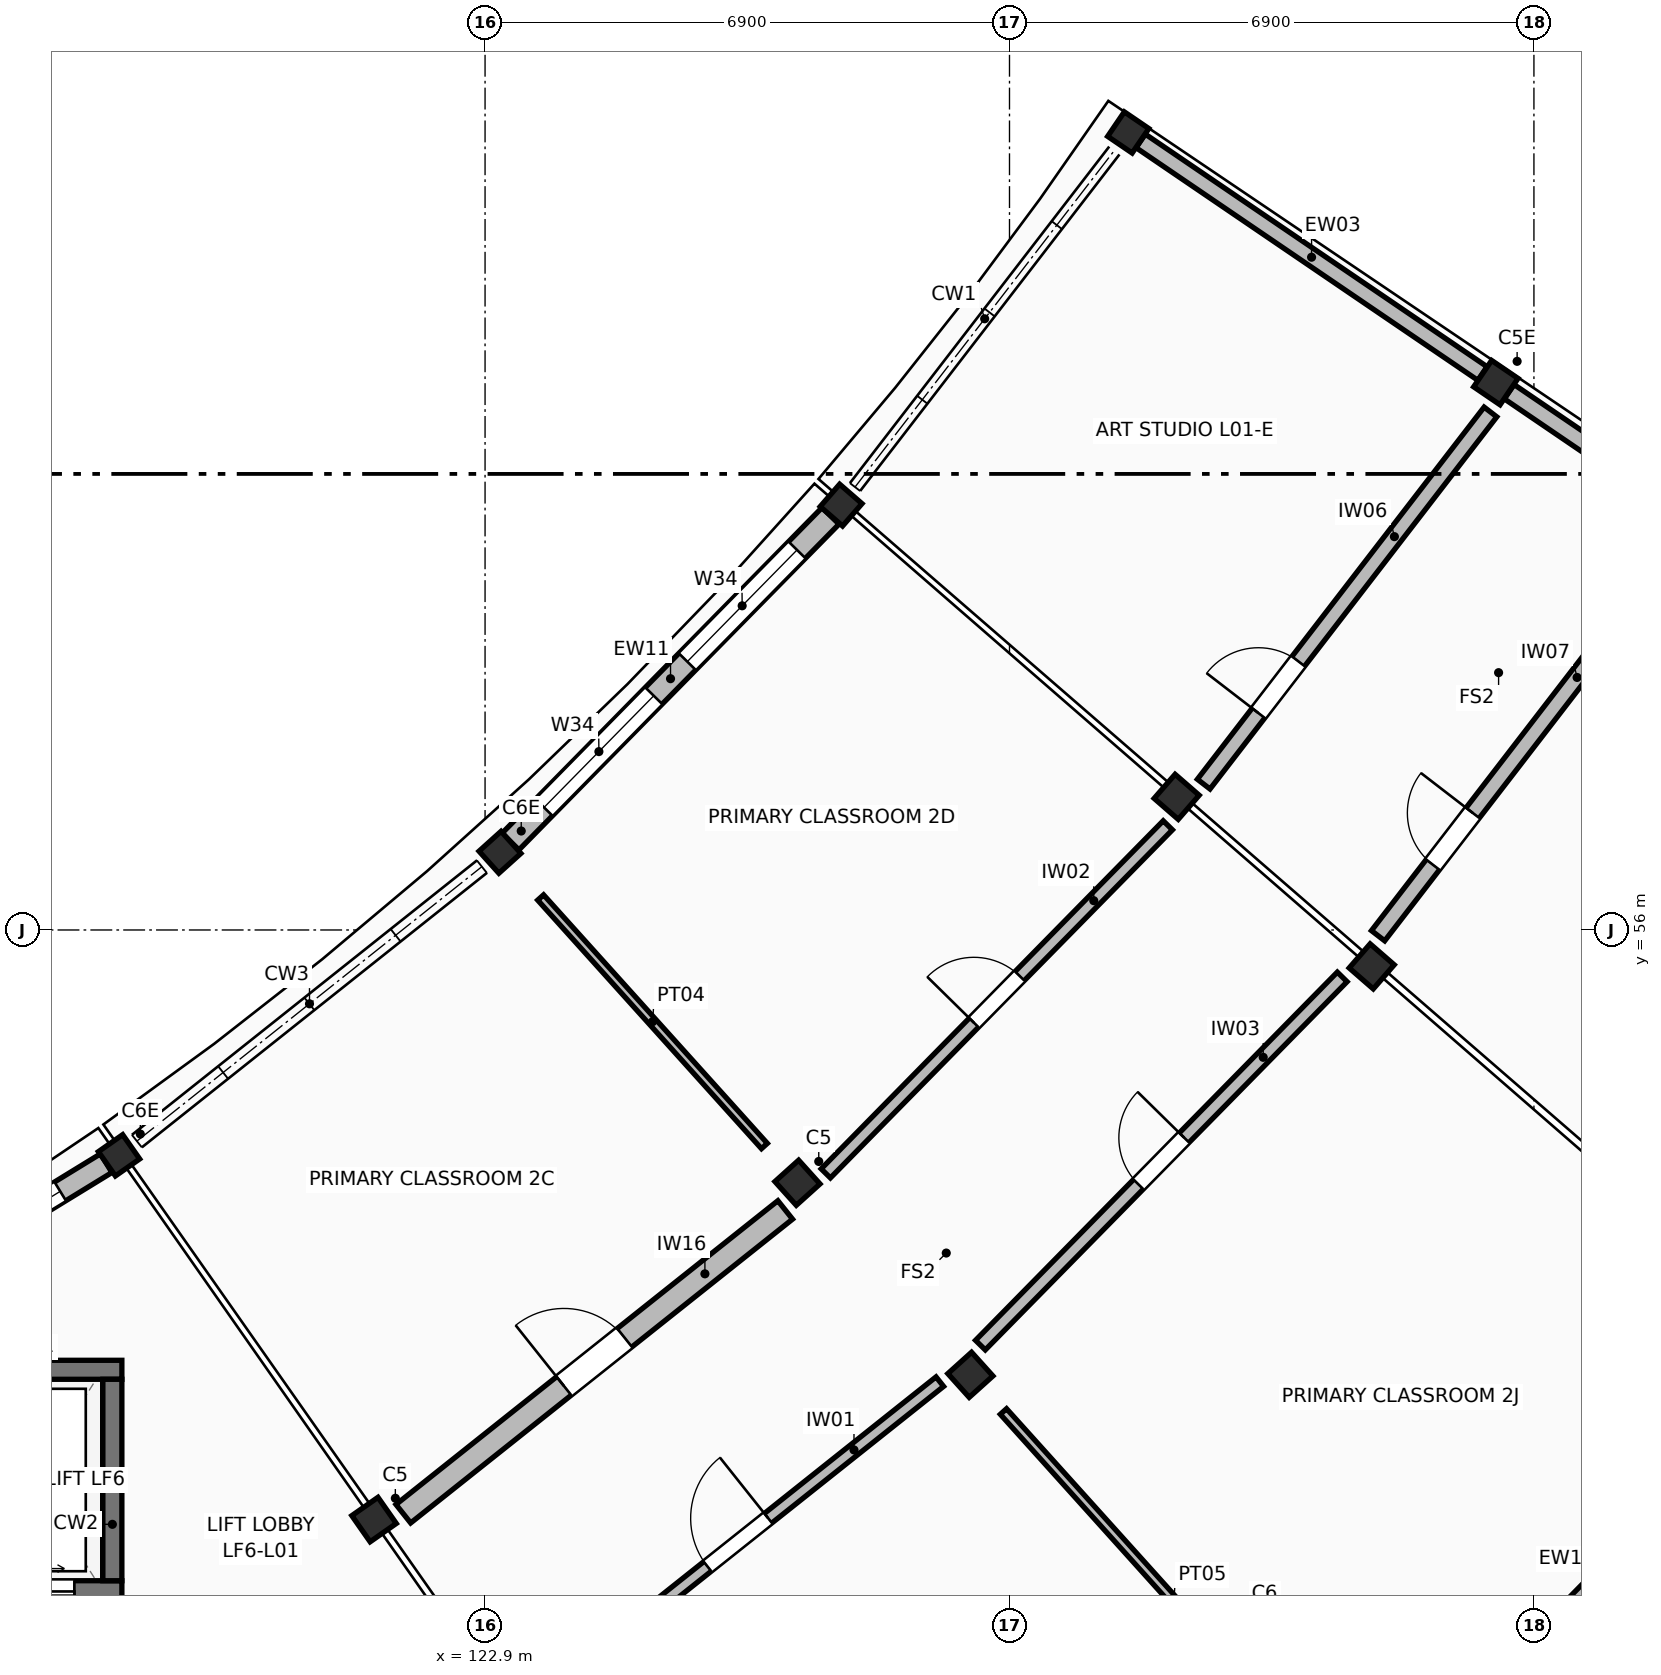
"""IFC4 building model, lengths in metres.
Left out: names, types, materials, properties, quantities, classifications, styles, units other than length and angle.
Written with IfcOpenShell. Run it as: python <this file> out.ifc"""

import sys

from ifc_helpers import new_model, si_unit, direction, frame, frame_2d, origin, origin_2d, place, context, subcontext, project, spatial, rectangle, extrude, element, fill, save


model = new_model("IFC4")
c1 = context("Model", 3, precision=1e-05, world=origin(), true_north=direction((0.0, 1.0)))
c2 = subcontext(c1, "Body", "Model", "MODEL_VIEW")
j1 = project(units=[si_unit("LENGTHUNIT", "METRE"), si_unit("PLANEANGLEUNIT", "RADIAN")], contexts=[c1])
p1 = place(None, origin())
s1 = spatial("IfcSite", under=j1, at=p1, CompositionType="ELEMENT")
p2 = place(p1, origin())
s2 = spatial("IfcBuilding", under=s1, at=p2, CompositionType="ELEMENT")
p3 = place(p2, frame((0.0, 0.0, 4.42)))
s3 = spatial("IfcBuildingStorey", under=s2, at=p3, CompositionType="ELEMENT", Elevation=4.42)
p4 = place(p3, frame((118.084, 53.035, 0.0), z_axis=(0.0, 0.0, 1.0), x_axis=(0.573576436351, -0.819152044289, 0.0)))
e1 = element("IfcColumn", 1, at=p4, inside=s3, PredefinedType="COLUMN", context=c2, shape_type="SweptSolid", body=[
    extrude(rectangle(XDim=0.39, YDim=0.39, at=origin_2d()), origin(), (0.0, 0.0, 1.0), 3.74),
])
p5 = place(p3, frame((121.439, 48.243, 0.0), z_axis=(0.0, 0.0, 1.0), x_axis=(0.573576436351, -0.819152044289, 0.0)))
e2 = element("IfcColumn", 2, at=p5, inside=s3, PredefinedType="COLUMN", context=c2, shape_type="SweptSolid", body=[
    extrude(rectangle(XDim=0.42, YDim=0.42, at=origin_2d()), origin(), (0.0, 0.0, 1.0), 3.74),
])
p6 = place(p3, frame((123.096, 57.022, 0.0), z_axis=(0.0, 0.0, 1.0), x_axis=(0.669130606359, -0.743144825477, 0.0)))
e3 = element("IfcColumn", 3, at=p6, inside=s3, PredefinedType="COLUMN", context=c2, shape_type="SweptSolid", body=[
    extrude(rectangle(XDim=0.39, YDim=0.39, at=origin_2d()), origin(), (0.0, 0.0, 1.0), 3.74),
])
for number, where, z_axis, x_axis in (
    (4, (127.01, 52.675, 0.0), (0.0, 0.0, 1.0), (0.669, -0.743, 0.0)),
    (5, (129.285, 50.148, 0.0), (0.0, 0.0, 1.0), (0.669, -0.743, 0.0)),
):
    element("IfcColumn", number, at=place(p3, frame(where, z_axis=z_axis, x_axis=x_axis)), inside=s3, PredefinedType="COLUMN", context=c2, shape_type="SweptSolid", body=[
        extrude(rectangle(XDim=0.42, YDim=0.42, at=origin_2d()), origin(), (0.0, 0.0, 1.0), 3.74),
    ])
p7 = place(p3, frame((127.584, 61.59, 0.0), z_axis=(0.0, 0.0, 1.0), x_axis=(0.754709580223, -0.656059028991, 0.0)))
e6 = element("IfcColumn", 6, at=p7, inside=s3, PredefinedType="COLUMN", context=c2, shape_type="SweptSolid", body=[
    extrude(rectangle(XDim=0.39, YDim=0.39, at=origin_2d()), origin(), (0.0, 0.0, 1.0), 3.74),
])
for number, where, z_axis, x_axis in (
    (7, (132.0, 57.752, 0.0), (0.0, 0.0, 1.0), (0.755, -0.656, 0.0)),
    (8, (134.566, 55.521, 0.0), (0.0, 0.0, 1.0), (0.755, -0.656, 0.0)),
):
    element("IfcColumn", number, at=place(p3, frame(where, z_axis=z_axis, x_axis=x_axis)), inside=s3, PredefinedType="COLUMN", context=c2, shape_type="SweptSolid", body=[
        extrude(rectangle(XDim=0.42, YDim=0.42, at=origin_2d()), origin(), (0.0, 0.0, 1.0), 3.74),
    ])
p8 = place(p3, frame((131.363, 66.492, 0.0), z_axis=(0.0, 0.0, 1.0), x_axis=(0.826786154745, -0.562516359159, 0.0)))
e9 = element("IfcColumn", 9, at=p8, inside=s3, PredefinedType="COLUMN", context=c2, shape_type="SweptSolid", body=[
    extrude(rectangle(XDim=0.39, YDim=0.39, at=origin_2d()), origin(), (0.0, 0.0, 1.0), 3.74),
])
p9 = place(p3, frame((136.199, 63.201, 0.0), z_axis=(0.0, 0.0, 1.0), x_axis=(0.826786154745, -0.562516359159, 0.0)))
e10 = element("IfcColumn", 10, at=p9, inside=s3, PredefinedType="COLUMN", context=c2, shape_type="SweptSolid", body=[
    extrude(rectangle(XDim=0.42, YDim=0.42, at=origin_2d()), origin(), (0.0, 0.0, 1.0), 3.74),
])
p10 = place(p3, frame((115.771, 50.214, 0.0), z_axis=(0.0, 0.0, 1.0), x_axis=(1.0, 0.0, 0.0)))
e11 = element("IfcWall", 11, at=p10, inside=s3, PredefinedType="SHEAR", context=c2, shape_type="SweptSolid", body=[
    extrude(rectangle(XDim=2.35, YDim=0.25, at=frame_2d((1.175, 0.0))), origin(), (0.0, 0.0, 1.0), 3.49),
])
p11 = place(p3, frame((115.771, 47.314, 0.0), z_axis=(0.0, 0.0, 1.0), x_axis=(1.0, 0.0, 0.0)))
e12 = element("IfcWall", 12, at=p11, inside=s3, PredefinedType="SHEAR", context=c2, shape_type="SweptSolid", body=[
    extrude(rectangle(XDim=2.35, YDim=0.25, at=frame_2d((1.175, 0.0))), origin(), (0.0, 0.0, 1.0), 3.49),
])
p12 = place(p11, frame((0.625, 0.0, 0.0)))
e13 = element("IfcOpeningElement", 13, at=p12, cuts=e12, PredefinedType="OPENING", context=c2, shape_type="SweptSolid", body=[
    extrude(rectangle(XDim=1.1, YDim=2.15, at=frame_2d((0.55, 1.075))), frame((0.0, 0.135, 0.0), z_axis=(0.0, -1.0, 0.0), x_axis=(1.0, 0.0, 0.0)), (0.0, 0.0, 1.0), 0.27),
])
p13 = place(p3, frame((117.996, 47.439, 0.0), z_axis=(0.0, 0.0, 1.0), x_axis=(0.0, 1.0, 0.0)))
e14 = element("IfcWall", 14, at=p13, inside=s3, PredefinedType="SHEAR", context=c2, shape_type="SweptSolid", body=[
    extrude(rectangle(XDim=2.65, YDim=0.25, at=frame_2d((1.325, 0.0))), origin(), (0.0, 0.0, 1.0), 3.49),
])
p14 = place(p3, frame((112.793, 49.793, 0.0), z_axis=(0.0, 0.0, 1.0), x_axis=(0.85263629261, 0.522504882775, 0.0)))
e15 = element("IfcWall", 15, at=p14, inside=s3, PredefinedType="STANDARD", context=c2, shape_type="SweptSolid", body=[
    extrude(rectangle(XDim=6.008, YDim=0.288, at=frame_2d((3.004, 0.0))), origin(), (0.0, 0.0, 1.0), 2.78),
])
p15 = place(p14, frame((0.709, 0.0, 0.95)))
e16 = element("IfcOpeningElement", 16, at=p15, cuts=e15, PredefinedType="OPENING", context=c2, shape_type="SweptSolid", body=[
    extrude(rectangle(XDim=1.94, YDim=1.6, at=frame_2d((0.97, 0.8))), frame((0.0, 0.154, 0.0), z_axis=(0.0, -1.0, 0.0), x_axis=(1.0, 0.0, 0.0)), (0.0, 0.0, 1.0), 0.308),
])
p16 = place(p14, frame((3.359, 0.0, 0.95)))
e17 = element("IfcOpeningElement", 17, at=p16, cuts=e15, PredefinedType="OPENING", context=c2, shape_type="SweptSolid", body=[
    extrude(rectangle(XDim=1.94, YDim=1.6, at=frame_2d((0.97, 0.8))), frame((0.0, 0.154, 0.0), z_axis=(0.0, -1.0, 0.0), x_axis=(1.0, 0.0, 0.0)), (0.0, 0.0, 1.0), 0.308),
])
p17 = place(p3, frame((123.235, 57.163, 0.0), z_axis=(0.0, 0.0, 1.0), x_axis=(0.700923686005, 0.713236276698, 0.0)))
e18 = element("IfcWall", 18, at=p17, inside=s3, PredefinedType="STANDARD", context=c2, shape_type="SweptSolid", body=[
    extrude(rectangle(XDim=6.008, YDim=0.312, at=frame_2d((3.004, 0.0))), origin(), (0.0, 0.0, 1.0), 2.78),
])
p18 = place(p17, frame((0.629, 0.0, 0.95)))
e19 = element("IfcOpeningElement", 19, at=p18, cuts=e18, PredefinedType="OPENING", context=c2, shape_type="SweptSolid", body=[
    extrude(rectangle(XDim=2.06, YDim=1.3, at=frame_2d((1.03, 0.65))), frame((0.0, 0.166, 0.0), z_axis=(0.0, -1.0, 0.0), x_axis=(1.0, 0.0, 0.0)), (0.0, 0.0, 1.0), 0.332),
])
p19 = place(p17, frame((3.319, 0.0, 0.95)))
e20 = element("IfcOpeningElement", 20, at=p19, cuts=e18, PredefinedType="OPENING", context=c2, shape_type="SweptSolid", body=[
    extrude(rectangle(XDim=2.06, YDim=1.3, at=frame_2d((1.03, 0.65))), frame((0.0, 0.166, 0.0), z_axis=(0.0, -1.0, 0.0), x_axis=(1.0, 0.0, 0.0)), (0.0, 0.0, 1.0), 0.332),
])
p20 = place(p3, frame((134.677, 44.456, 0.0), z_axis=(0.0, 0.0, 1.0), x_axis=(0.70091301262, 0.713246765671, 0.0)))
e21 = element("IfcWall", 21, at=p20, inside=s3, PredefinedType="STANDARD", context=c2, shape_type="SweptSolid", body=[
    extrude(rectangle(XDim=8.096, YDim=0.324, at=frame_2d((4.048, 0.0))), origin(), (0.0, 0.0, 1.0), 2.78),
])
p21 = place(p20, frame((1.325, 0.0, 0.95)))
e22 = element("IfcOpeningElement", 22, at=p21, cuts=e21, PredefinedType="OPENING", context=c2, shape_type="SweptSolid", body=[
    extrude(rectangle(XDim=2.06, YDim=1.45, at=frame_2d((1.03, 0.725))), frame((0.0, 0.172, 0.0), z_axis=(0.0, -1.0, 0.0), x_axis=(1.0, 0.0, 0.0)), (0.0, 0.0, 1.0), 0.344),
])
p22 = place(p20, frame((4.711, 0.0, 0.95)))
e23 = element("IfcOpeningElement", 23, at=p22, cuts=e21, PredefinedType="OPENING", context=c2, shape_type="SweptSolid", body=[
    extrude(rectangle(XDim=2.06, YDim=1.45, at=frame_2d((1.03, 0.725))), frame((0.0, 0.172, 0.0), z_axis=(0.0, -1.0, 0.0), x_axis=(1.0, 0.0, 0.0)), (0.0, 0.0, 1.0), 0.344),
])
p23 = place(p3, frame((131.526, 66.381, 0.0), z_axis=(0.0, 0.0, 1.0), x_axis=(0.826743616666, -0.562578876516, 0.0)))
e24 = element("IfcWall", 24, at=p23, inside=s3, PredefinedType="STANDARD", context=c2, shape_type="SweptSolid", body=[
    extrude(rectangle(XDim=5.439, YDim=0.216, at=frame_2d((2.719, 0.0))), origin(), (0.0, 0.0, 1.0), 2.78),
])
p24 = place(p3, frame((136.375, 63.081, 0.0), z_axis=(0.0, 0.0, 1.0), x_axis=(0.826746288828, -0.562574949592, 0.0)))
e25 = element("IfcWall", 25, at=p24, inside=s3, PredefinedType="STANDARD", context=c2, shape_type="SweptSolid", body=[
    extrude(rectangle(XDim=2.974, YDim=0.228, at=frame_2d((1.487, 0.0))), origin(), (0.0, 0.0, 1.0), 2.78),
])
p25 = place(p3, frame((121.824, 48.32, 0.0), z_axis=(0.0, 0.0, 1.0), x_axis=(0.782605685559, 0.622517743467, 0.0)))
e26 = element("IfcWall", 26, at=p25, inside=s3, PredefinedType="STANDARD", context=c2, shape_type="SweptSolid", body=[
    extrude(rectangle(XDim=6.42, YDim=0.31, at=frame_2d((3.21, 0.0))), origin(), (0.0, 0.0, 1.0), 2.75),
])
p26 = place(p25, frame((2.7, 0.0, 0.0)))
e27 = element("IfcOpeningElement", 27, at=p26, cuts=e26, PredefinedType="OPENING", context=c2, shape_type="SweptSolid", body=[
    extrude(rectangle(XDim=1.02, YDim=2.18, at=frame_2d((0.51, 1.09))), frame((0.0, 0.165, 0.0), z_axis=(0.0, -1.0, 0.0), x_axis=(1.0, 0.0, 0.0)), (0.0, 0.0, 1.0), 0.33),
])
p27 = place(p3, frame((123.568, 45.83, 0.0), z_axis=(0.0, 0.0, 1.0), x_axis=(0.782615780998, 0.622505051653, 0.0)))
e28 = element("IfcWall", 28, at=p27, inside=s3, PredefinedType="STANDARD", context=c2, shape_type="SweptSolid", body=[
    extrude(rectangle(XDim=6.792, YDim=0.16, at=frame_2d((3.396, 0.0))), origin(), (0.0, 0.0, 1.0), 2.75),
])
p28 = place(p27, frame((2.886, 0.0, 0.0)))
e29 = element("IfcOpeningElement", 29, at=p28, cuts=e28, PredefinedType="OPENING", context=c2, shape_type="SweptSolid", body=[
    extrude(rectangle(XDim=1.02, YDim=2.24, at=frame_2d((0.51, 1.12))), frame((0.0, 0.09, 0.0), z_axis=(0.0, -1.0, 0.0), x_axis=(1.0, 0.0, 0.0)), (0.0, 0.0, 1.0), 0.18),
])
p29 = place(p3, frame((127.383, 52.798, 0.0), z_axis=(0.0, 0.0, 1.0), x_axis=(0.700900509406, 0.713259052459, 0.0)))
e30 = element("IfcWall", 30, at=p29, inside=s3, PredefinedType="STANDARD", context=c2, shape_type="SweptSolid", body=[
    extrude(rectangle(XDim=6.42, YDim=0.17, at=frame_2d((3.21, 0.0))), origin(), (0.0, 0.0, 1.0), 2.75),
])
p30 = place(p29, frame((2.78, 0.0, 0.0)))
e31 = element("IfcOpeningElement", 31, at=p30, cuts=e30, PredefinedType="OPENING", context=c2, shape_type="SweptSolid", body=[
    extrude(rectangle(XDim=0.86, YDim=2.06, at=frame_2d((0.43, 1.03))), frame((0.0, 0.095, 0.0), z_axis=(0.0, -1.0, 0.0), x_axis=(1.0, 0.0, 0.0)), (0.0, 0.0, 1.0), 0.19),
])
p31 = place(p3, frame((129.417, 50.539, 0.0), z_axis=(0.0, 0.0, 1.0), x_axis=(0.700914816473, 0.713244993006, 0.0)))
e32 = element("IfcWall", 32, at=p31, inside=s3, PredefinedType="STANDARD", context=c2, shape_type="SweptSolid", body=[
    extrude(rectangle(XDim=6.792, YDim=0.18, at=frame_2d((3.396, 0.0))), origin(), (0.0, 0.0, 1.0), 2.75),
])
p32 = place(p31, frame((2.966, 0.0, 0.0)))
e33 = element("IfcOpeningElement", 33, at=p32, cuts=e32, PredefinedType="OPENING", context=c2, shape_type="SweptSolid", body=[
    extrude(rectangle(XDim=0.86, YDim=2.12, at=frame_2d((0.43, 1.06))), frame((0.0, 0.1, 0.0), z_axis=(0.0, -1.0, 0.0), x_axis=(1.0, 0.0, 0.0)), (0.0, 0.0, 1.0), 0.2),
])
p33 = place(p3, frame((123.631, 56.427, 0.0), z_axis=(0.0, 0.0, 1.0), x_axis=(0.669157836149, -0.743120306761, 0.0)))
e34 = element("IfcWall", 34, at=p33, inside=s3, PredefinedType="PARTITIONING", context=c2, shape_type="SweptSolid", body=[
    extrude(rectangle(XDim=4.4, YDim=0.104, at=frame_2d((2.2, 0.0))), origin(), (0.0, 0.0, 1.0), 2.75),
])
p34 = place(p3, frame((129.72, 49.665, 0.0), z_axis=(0.0, 0.0, 1.0), x_axis=(0.669115705072, -0.743158242386, 0.0)))
e35 = element("IfcWall", 35, at=p34, inside=s3, PredefinedType="PARTITIONING", context=c2, shape_type="SweptSolid", body=[
    extrude(rectangle(XDim=6.7, YDim=0.11, at=frame_2d((3.35, 0.0))), origin(), (0.0, 0.0, 1.0), 2.75),
])
p35 = place(p3, frame((132.355, 57.919, 0.0), z_axis=(0.0, 0.0, 1.0), x_axis=(0.610376740954, 0.79211125109, 0.0)))
e36 = element("IfcWall", 36, at=p35, inside=s3, PredefinedType="STANDARD", context=c2, shape_type="SweptSolid", body=[
    extrude(rectangle(XDim=6.181, YDim=0.21, at=frame_2d((3.09, 0.0))), origin(), (0.0, 0.0, 1.0), 2.75),
])
p36 = place(p35, frame((1.18, 0.0, 0.0)))
e37 = element("IfcOpeningElement", 37, at=p36, cuts=e36, PredefinedType="OPENING", context=c2, shape_type="SweptSolid", body=[
    extrude(rectangle(XDim=0.86, YDim=2.18, at=frame_2d((0.43, 1.09))), frame((0.0, 0.115, 0.0), z_axis=(0.0, -1.0, 0.0), x_axis=(1.0, 0.0, 0.0)), (0.0, 0.0, 1.0), 0.23),
])
p37 = place(p3, frame((134.649, 55.924, 0.0), z_axis=(0.0, 0.0, 1.0), x_axis=(0.610378079511, 0.792110219637, 0.0)))
e38 = element("IfcWall", 38, at=p37, inside=s3, PredefinedType="STANDARD", context=c2, shape_type="SweptSolid", body=[
    extrude(rectangle(XDim=6.54, YDim=0.22, at=frame_2d((3.27, 0.0))), origin(), (0.0, 0.0, 1.0), 2.75),
])
p38 = place(p37, frame((1.18, 0.0, 0.0)))
e39 = element("IfcOpeningElement", 39, at=p38, cuts=e38, PredefinedType="OPENING", context=c2, shape_type="SweptSolid", body=[
    extrude(rectangle(XDim=0.86, YDim=2.24, at=frame_2d((0.43, 1.12))), frame((0.0, 0.12, 0.0), z_axis=(0.0, -1.0, 0.0), x_axis=(1.0, 0.0, 0.0)), (0.0, 0.0, 1.0), 0.24),
])
p39 = place(p16, origin())
e40 = element("IfcWindow", 40, at=p39, inside=s3, PartitioningType="SINGLE_PANEL", PredefinedType="WINDOW", context=c2, shape_type="SweptSolid", body=[
    extrude(rectangle(XDim=1.94, YDim=1.6, at=frame_2d((0.97, 0.8))), frame((0.0, 0.03, 0.0), z_axis=(0.0, -1.0, 0.0), x_axis=(1.0, 0.0, 0.0)), (0.0, 0.0, 1.0), 0.06),
])
fill(e17, e40)
p40 = place(p18, origin())
e41 = element("IfcWindow", 41, at=p40, inside=s3, PartitioningType="SINGLE_PANEL", PredefinedType="WINDOW", context=c2, shape_type="SweptSolid", body=[
    extrude(rectangle(XDim=2.06, YDim=1.3, at=frame_2d((1.03, 0.65))), frame((0.0, 0.03, 0.0), z_axis=(0.0, -1.0, 0.0), x_axis=(1.0, 0.0, 0.0)), (0.0, 0.0, 1.0), 0.06),
])
fill(e19, e41)
p41 = place(p19, origin())
e42 = element("IfcWindow", 42, at=p41, inside=s3, PartitioningType="SINGLE_PANEL", PredefinedType="WINDOW", context=c2, shape_type="SweptSolid", body=[
    extrude(rectangle(XDim=2.06, YDim=1.3, at=frame_2d((1.03, 0.65))), frame((0.0, 0.03, 0.0), z_axis=(0.0, -1.0, 0.0), x_axis=(1.0, 0.0, 0.0)), (0.0, 0.0, 1.0), 0.06),
])
fill(e20, e42)
p42 = place(p12, origin())
e43 = element("IfcDoor", 43, at=p42, inside=s3, OperationType="DOUBLE_DOOR_SLIDING", PredefinedType="DOOR", context=c2, shape_type="SweptSolid", body=[
    extrude(rectangle(XDim=1.1, YDim=2.15, at=frame_2d((0.55, 1.075))), frame((0.0, 0.025, 0.0), z_axis=(0.0, -1.0, 0.0), x_axis=(1.0, 0.0, 0.0)), (0.0, 0.0, 1.0), 0.05),
])
fill(e13, e43)
p43 = place(p26, frame((1.02, 0.0, 0.0), z_axis=(0.0, 0.0, 1.0), x_axis=(-1.0, 0.0, 0.0)))
e44 = element("IfcDoor", 44, at=p43, inside=s3, OperationType="SINGLE_SWING_LEFT", PredefinedType="DOOR", context=c2, shape_type="SweptSolid", body=[
    extrude(rectangle(XDim=1.02, YDim=2.18, at=frame_2d((0.51, 1.09))), frame((0.0, 0.025, 0.0), z_axis=(0.0, -1.0, 0.0), x_axis=(1.0, 0.0, 0.0)), (0.0, 0.0, 1.0), 0.05),
])
fill(e27, e44)
p44 = place(p28, origin())
e45 = element("IfcDoor", 45, at=p44, inside=s3, OperationType="SINGLE_SWING_RIGHT", PredefinedType="DOOR", context=c2, shape_type="SweptSolid", body=[
    extrude(rectangle(XDim=1.02, YDim=2.24, at=frame_2d((0.51, 1.12))), frame((0.0, 0.025, 0.0), z_axis=(0.0, -1.0, 0.0), x_axis=(1.0, 0.0, 0.0)), (0.0, 0.0, 1.0), 0.05),
])
fill(e29, e45)
p45 = place(p30, frame((0.86, 0.0, 0.0), z_axis=(0.0, 0.0, 1.0), x_axis=(-1.0, 0.0, 0.0)))
e46 = element("IfcDoor", 46, at=p45, inside=s3, OperationType="SINGLE_SWING_LEFT", PredefinedType="DOOR", context=c2, shape_type="SweptSolid", body=[
    extrude(rectangle(XDim=0.86, YDim=2.06, at=frame_2d((0.43, 1.03))), frame((0.0, 0.025, 0.0), z_axis=(0.0, -1.0, 0.0), x_axis=(1.0, 0.0, 0.0)), (0.0, 0.0, 1.0), 0.05),
])
fill(e31, e46)
p46 = place(p32, origin())
e47 = element("IfcDoor", 47, at=p46, inside=s3, OperationType="SINGLE_SWING_RIGHT", PredefinedType="DOOR", context=c2, shape_type="SweptSolid", body=[
    extrude(rectangle(XDim=0.86, YDim=2.12, at=frame_2d((0.43, 1.06))), frame((0.0, 0.025, 0.0), z_axis=(0.0, -1.0, 0.0), x_axis=(1.0, 0.0, 0.0)), (0.0, 0.0, 1.0), 0.05),
])
fill(e33, e47)
p47 = place(p36, frame((0.86, 0.0, 0.0), z_axis=(0.0, 0.0, 1.0), x_axis=(-1.0, 0.0, 0.0)))
e48 = element("IfcDoor", 48, at=p47, inside=s3, OperationType="SINGLE_SWING_LEFT", PredefinedType="DOOR", context=c2, shape_type="SweptSolid", body=[
    extrude(rectangle(XDim=0.86, YDim=2.18, at=frame_2d((0.43, 1.09))), frame((0.0, 0.025, 0.0), z_axis=(0.0, -1.0, 0.0), x_axis=(1.0, 0.0, 0.0)), (0.0, 0.0, 1.0), 0.05),
])
fill(e37, e48)
p48 = place(p38, origin())
e49 = element("IfcDoor", 49, at=p48, inside=s3, OperationType="SINGLE_SWING_RIGHT", PredefinedType="DOOR", context=c2, shape_type="SweptSolid", body=[
    extrude(rectangle(XDim=0.86, YDim=2.24, at=frame_2d((0.43, 1.12))), frame((0.0, 0.025, 0.0), z_axis=(0.0, -1.0, 0.0), x_axis=(1.0, 0.0, 0.0)), (0.0, 0.0, 1.0), 0.05),
])
fill(e39, e49)
save(model, sys.argv[1])
